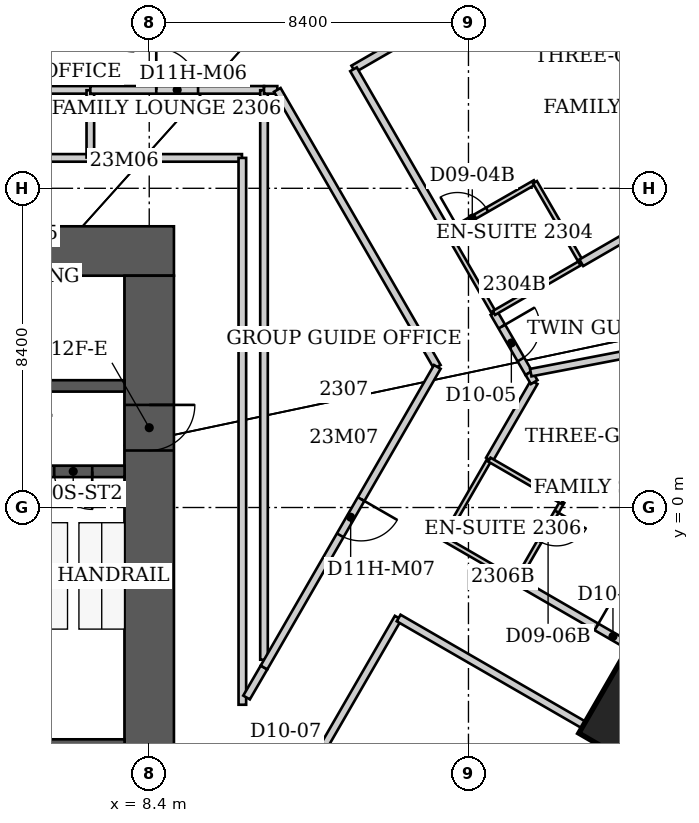
"""IFC4 building model, lengths in metres.
Left out: names, types, materials, properties, quantities, classifications, styles, units other than length and angle.
Written with IfcOpenShell. Run it as: python <this file> out.ifc"""

import sys

from ifc_helpers import new_model, si_unit, direction, frame, frame_2d, origin, origin_2d, place, context, subcontext, project, spatial, rectangle, extrude, clip, halfspace, element, fill, save


model = new_model("IFC4")
c1 = context("Model", 3, precision=1e-05, world=origin(), true_north=direction((0.0, 1.0)))
c2 = subcontext(c1, "Body", "Model", "MODEL_VIEW")
j1 = project(units=[si_unit("LENGTHUNIT", "METRE"), si_unit("PLANEANGLEUNIT", "RADIAN")], contexts=[c1])
p1 = place(None, origin())
s1 = spatial("IfcSite", under=j1, at=p1, CompositionType="ELEMENT")
p2 = place(p1, origin())
s2 = spatial("IfcBuilding", under=s1, at=p2, CompositionType="ELEMENT")
p3 = place(p2, frame((0.0, 0.0, 96.8)))
s3 = spatial("IfcBuildingStorey", under=s2, at=p3, CompositionType="ELEMENT", Elevation=96.8)
p4 = place(p3, frame((21.344, -5.499, -0.056), z_axis=(0.0, 0.0, 1.0), x_axis=(0.866025403784, -0.5, 0.0)))
e1 = element("IfcColumn", 1, at=p4, inside=s3, PredefinedType="COLUMN", context=c2, shape_type="SweptSolid", body=[
    clip(extrude(rectangle(XDim=2.4, YDim=2.4, at=origin_2d()), origin(), (0.0, 0.0, 1.0), 3.856), halfspace(frame((0.0, 0.0, 0.056)), True)),
])
p5 = place(p3, frame((-9.05, 6.75, 0.0), z_axis=(0.0, 0.0, 1.0), x_axis=(1.0, 0.0, 0.0)))
e2 = element("IfcWall", 2, at=p5, inside=s3, PredefinedType="SHEAR", context=c2, shape_type="SweptSolid", body=[
    extrude(rectangle(XDim=18.1, YDim=1.3, at=frame_2d((9.05, 0.0))), origin(), (0.0, 0.0, 1.0), 3.8),
])
p6 = place(p3, frame((8.4, -9.2, 0.0), z_axis=(0.0, 0.0, 1.0), x_axis=(0.0, 1.0, 0.0)))
e3 = element("IfcWall", 3, at=p6, inside=s3, PredefinedType="SHEAR", context=c2, shape_type="SweptSolid", body=[
    extrude(rectangle(XDim=15.3, YDim=1.3, at=frame_2d((7.65, 0.0))), origin(), (0.0, 0.0, 1.0), 3.8),
])
p7 = place(p6, frame((10.7, 0.0, 0.0)))
e4 = element("IfcOpeningElement", 4, at=p7, cuts=e3, PredefinedType="OPENING", context=c2, shape_type="SweptSolid", body=[
    extrude(rectangle(XDim=1.2, YDim=2.2, at=frame_2d((0.6, 1.1))), frame((0.0, 0.65, 0.0), z_axis=(0.0, -1.0, 0.0), x_axis=(1.0, 0.0, 0.0)), (0.0, 0.0, 1.0), 1.3),
])
p8 = place(p3, frame((-7.75, -6.5, 0.0), z_axis=(0.0, 0.0, 1.0), x_axis=(1.0, 0.0, 0.0)))
e5 = element("IfcWall", 5, at=p8, inside=s3, PredefinedType="SHEAR", context=c2, shape_type="SweptSolid", body=[
    extrude(rectangle(XDim=15.5, YDim=0.8, at=frame_2d((7.75, 0.0))), origin(), (0.0, 0.0, 1.0), 3.8),
])
p9 = place(p3, frame((4.75, 0.95, 0.0), z_axis=(0.0, 0.0, 1.0), x_axis=(1.0, 0.0, 0.0)))
e6 = element("IfcWall", 6, at=p9, inside=s3, PredefinedType="SHEAR", context=c2, shape_type="SweptSolid", body=[
    extrude(rectangle(XDim=3.0, YDim=0.3, at=frame_2d((1.5, 0.0))), origin(), (0.0, 0.0, 1.0), 3.8),
])
p10 = place(p9, frame((1.15, 0.0, 0.0)))
e7 = element("IfcOpeningElement", 7, at=p10, cuts=e6, PredefinedType="OPENING", context=c2, shape_type="SweptSolid", body=[
    extrude(rectangle(XDim=1.0, YDim=2.2, at=frame_2d((0.5, 1.1))), frame((0.0, 0.15, 0.0), z_axis=(0.0, -1.0, 0.0), x_axis=(1.0, 0.0, 0.0)), (0.0, 0.0, 1.0), 0.3),
])
p11 = place(p3, frame((-7.75, 3.2, 0.0), z_axis=(0.0, 0.0, 1.0), x_axis=(1.0, 0.0, 0.0)))
e8 = element("IfcWall", 8, at=p11, inside=s3, PredefinedType="SHEAR", context=c2, shape_type="SweptSolid", body=[
    extrude(rectangle(XDim=15.5, YDim=0.3, at=frame_2d((7.75, 0.0))), origin(), (0.0, 0.0, 1.0), 3.8),
])
p12 = place(p11, frame((9.825, 0.0, 0.0)))
e9 = element("IfcOpeningElement", 9, at=p12, cuts=e8, PredefinedType="OPENING", context=c2, shape_type="SweptSolid", body=[
    extrude(rectangle(XDim=1.1, YDim=2.2, at=frame_2d((0.55, 1.1))), frame((0.0, 0.15, 0.0), z_axis=(0.0, -1.0, 0.0), x_axis=(1.0, 0.0, 0.0)), (0.0, 0.0, 1.0), 0.3),
])
p13 = place(p3, frame((11.024, -29.171, 0.0), z_axis=(0.0, 0.0, 1.0), x_axis=(0.499999235055, 0.866025845425, 0.0)))
e10 = element("IfcWall", 10, at=p13, inside=s3, PredefinedType="PARAPET", context=c2, shape_type="SweptSolid", body=[
    extrude(rectangle(XDim=39.5, YDim=0.25, at=frame_2d((19.75, 0.0))), origin(), (0.0, 0.0, 1.0), 1.1),
])
p14 = place(p3, frame((2.28, 10.99, 0.0), z_axis=(0.0, 0.0, 1.0), x_axis=(1.0, 0.0, 0.0)))
e11 = element("IfcWall", 11, at=p14, inside=s3, PredefinedType="PARTITIONING", context=c2, shape_type="SweptSolid", body=[
    extrude(rectangle(XDim=4.57, YDim=0.2, at=frame_2d((2.285, 0.0))), origin(), (0.0, 0.0, 1.0), 3.64),
])
p15 = place(p14, frame((1.735, 0.0, 0.0)))
e12 = element("IfcOpeningElement", 12, at=p15, cuts=e11, PredefinedType="OPENING", context=c2, shape_type="SweptSolid", body=[
    extrude(rectangle(XDim=1.1, YDim=2.2, at=frame_2d((0.55, 1.1))), frame((0.0, 0.1, 0.0), z_axis=(0.0, -1.0, 0.0), x_axis=(1.0, 0.0, 0.0)), (0.0, 0.0, 1.0), 0.2),
])
p16 = place(p3, frame((6.85, 9.2, 0.0), z_axis=(0.0, 0.0, 1.0), x_axis=(-1.0, 0.0, 0.0)))
e13 = element("IfcWall", 13, at=p16, inside=s3, PredefinedType="PARTITIONING", context=c2, shape_type="SweptSolid", body=[
    extrude(rectangle(XDim=4.57, YDim=0.2, at=frame_2d((2.285, 0.0))), origin(), (0.0, 0.0, 1.0), 3.64),
])
p17 = place(p3, frame((6.85, 10.98, 0.0), z_axis=(0.0, 0.0, 1.0), x_axis=(0.0, -1.0, 0.0)))
e14 = element("IfcWall", 14, at=p17, inside=s3, PredefinedType="PARTITIONING", context=c2, shape_type="SweptSolid", body=[
    extrude(rectangle(XDim=1.77, YDim=0.2, at=frame_2d((0.885, 0.0))), origin(), (0.0, 0.0, 1.0), 3.64),
])
p18 = place(p3, frame((6.85, 10.99, 0.0), z_axis=(0.0, 0.0, 1.0), x_axis=(1.0, 0.0, 0.0)))
e15 = element("IfcWall", 15, at=p18, inside=s3, PredefinedType="PARTITIONING", context=c2, shape_type="SweptSolid", body=[
    extrude(rectangle(XDim=4.57, YDim=0.2, at=frame_2d((2.285, 0.0))), origin(), (0.0, 0.0, 1.0), 3.64),
])
p19 = place(p18, frame((1.735, 0.0, 0.0)))
e16 = element("IfcOpeningElement", 16, at=p19, cuts=e15, PredefinedType="OPENING", context=c2, shape_type="SweptSolid", body=[
    extrude(rectangle(XDim=1.1, YDim=2.2, at=frame_2d((0.55, 1.1))), frame((0.0, 0.1, 0.0), z_axis=(0.0, -1.0, 0.0), x_axis=(1.0, 0.0, 0.0)), (0.0, 0.0, 1.0), 0.2),
])
p20 = place(p3, frame((10.59, -10.45, 0.0), z_axis=(0.0, 0.0, 1.0), x_axis=(0.500072306674, 0.865983653482, 0.0)))
e17 = element("IfcWall", 17, at=p20, inside=s3, PredefinedType="PARTITIONING", context=c2, shape_type="SweptSolid", body=[
    extrude(rectangle(XDim=8.719, YDim=0.2, at=frame_2d((4.359, 0.0))), origin(), (0.0, 0.0, 1.0), 3.64),
])
p21 = place(p20, frame((3.859, 0.0, 0.0)))
e18 = element("IfcOpeningElement", 18, at=p21, cuts=e17, PredefinedType="OPENING", context=c2, shape_type="SweptSolid", body=[
    extrude(rectangle(XDim=1.0, YDim=2.13, at=frame_2d((0.5, 1.065))), frame((0.0, 0.1, 0.0), z_axis=(0.0, -1.0, 0.0), x_axis=(1.0, 0.0, 0.0)), (0.0, 0.0, 1.0), 0.2),
])
p22 = place(p3, frame((10.84, 9.2, 0.0), z_axis=(0.0, 0.0, 1.0), x_axis=(-1.0, 0.0, 0.0)))
e19 = element("IfcWall", 19, at=p22, inside=s3, PredefinedType="PARTITIONING", context=c2, shape_type="SweptSolid", body=[
    extrude(rectangle(XDim=3.99, YDim=0.2, at=frame_2d((1.995, 0.0))), origin(), (0.0, 0.0, 1.0), 3.64),
])
p23 = place(p3, frame((10.85, -5.19, 0.0), z_axis=(0.0, 0.0, 1.0), x_axis=(0.0, 1.0, 0.0)))
e20 = element("IfcWall", 20, at=p23, inside=s3, PredefinedType="PARTITIONING", context=c2, shape_type="SweptSolid", body=[
    extrude(rectangle(XDim=14.39, YDim=0.2, at=frame_2d((7.195, 0.0))), origin(), (0.0, 0.0, 1.0), 3.64),
])
p24 = place(p3, frame((11.42, -4.21, 0.0), z_axis=(0.0, 0.0, 1.0), x_axis=(-0.502657614045, -0.8644855829, 0.0)))
e21 = element("IfcWall", 21, at=p24, inside=s3, PredefinedType="PARTITIONING", context=c2, shape_type="SweptSolid", body=[
    extrude(rectangle(XDim=0.914, YDim=0.2, at=frame_2d((0.457, 0.0))), origin(), (0.0, 0.0, 1.0), 3.64),
])
p25 = place(p3, frame((11.42, 10.98, 0.0), z_axis=(0.0, 0.0, 1.0), x_axis=(0.0, -1.0, 0.0)))
e22 = element("IfcWall", 22, at=p25, inside=s3, PredefinedType="PARTITIONING", context=c2, shape_type="SweptSolid", body=[
    extrude(rectangle(XDim=14.985, YDim=0.2, at=frame_2d((7.492, 0.0))), origin(), (0.0, 0.0, 1.0), 3.64),
])
p26 = place(p3, frame((11.42, 10.99, 0.0), z_axis=(0.0, 0.0, 1.0), x_axis=(1.0, 0.0, 0.0)))
e23 = element("IfcWall", 23, at=p26, inside=s3, PredefinedType="PARTITIONING", context=c2, shape_type="SweptSolid", body=[
    extrude(rectangle(XDim=0.35, YDim=0.2, at=frame_2d((0.175, 0.0))), origin(), (0.0, 0.0, 1.0), 3.64),
])
p27 = place(p3, frame((11.77, 10.99, 0.0), z_axis=(0.0, 0.0, 1.0), x_axis=(0.500093981358, -0.865971136822, 0.0)))
e24 = element("IfcWall", 24, at=p27, inside=s3, PredefinedType="PARTITIONING", context=c2, shape_type="SweptSolid", body=[
    extrude(rectangle(XDim=8.418, YDim=0.2, at=frame_2d((4.209, 0.0))), origin(), (0.0, 0.0, 1.0), 3.64),
])
p28 = place(p3, frame((13.77, 11.54, 0.0), z_axis=(0.0, 0.0, 1.0), x_axis=(0.865951726818, 0.500127590541, 0.0)))
e25 = element("IfcWall", 25, at=p28, inside=s3, PredefinedType="PARTITIONING", context=c2, shape_type="SweptSolid", body=[
    extrude(rectangle(XDim=10.467, YDim=0.2, at=frame_2d((5.233, 0.0))), origin(), (0.0, 0.0, 1.0), 3.64),
])
p29 = place(p28, frame((4.734, 0.0, 0.0)))
e26 = element("IfcOpeningElement", 26, at=p29, cuts=e25, PredefinedType="OPENING", context=c2, shape_type="SweptSolid", body=[
    extrude(rectangle(XDim=1.0, YDim=2.13, at=frame_2d((0.5, 1.065))), frame((0.0, 0.1, 0.0), z_axis=(0.0, -1.0, 0.0), x_axis=(1.0, 0.0, 0.0)), (0.0, 0.0, 1.0), 0.2),
])
p30 = place(p3, frame((13.775, 11.531, 0.0), z_axis=(0.0, 0.0, 1.0), x_axis=(0.499378257914, -0.866384069292, 0.0)))
e27 = element("IfcWall", 27, at=p30, inside=s3, PredefinedType="PARTITIONING", context=c2, shape_type="SweptSolid", body=[
    extrude(rectangle(XDim=4.954, YDim=0.2, at=frame_2d((2.477, 0.0))), origin(), (0.0, 0.0, 1.0), 3.64),
])
p31 = place(p3, frame((14.963, -2.907, 0.0), z_axis=(0.0, 0.0, 1.0), x_axis=(0.865876457216, -0.50025789433, 0.0)))
e28 = element("IfcWall", 28, at=p31, inside=s3, PredefinedType="PARTITIONING", context=c2, shape_type="SweptSolid", body=[
    extrude(rectangle(XDim=8.051, YDim=0.2, at=frame_2d((4.025, 0.0))), origin(), (0.0, 0.0, 1.0), 3.64),
])
p32 = place(p3, frame((15.98, 3.7, 0.0), z_axis=(0.0, 0.0, 1.0), x_axis=(-0.499446957289, -0.866344467781, 0.0)))
e29 = element("IfcWall", 29, at=p32, inside=s3, PredefinedType="PARTITIONING", context=c2, shape_type="SweptSolid", body=[
    extrude(rectangle(XDim=9.13, YDim=0.2, at=frame_2d((4.565, 0.0))), origin(), (0.0, 0.0, 1.0), 3.64),
])
p33 = place(p32, frame((4.015, 0.0, 0.0)))
e30 = element("IfcOpeningElement", 30, at=p33, cuts=e29, PredefinedType="OPENING", context=c2, shape_type="SweptSolid", body=[
    extrude(rectangle(XDim=1.1, YDim=2.2, at=frame_2d((0.55, 1.1))), frame((0.0, 0.1, 0.0), z_axis=(0.0, -1.0, 0.0), x_axis=(1.0, 0.0, 0.0)), (0.0, 0.0, 1.0), 0.2),
])
p34 = place(p3, frame((16.15, -0.82, 0.0), z_axis=(0.0, 0.0, 1.0), x_axis=(0.499769390944, 0.866158505053, 0.0)))
e31 = element("IfcWall", 31, at=p34, inside=s3, PredefinedType="PARTITIONING", context=c2, shape_type="SweptSolid", body=[
    extrude(rectangle(XDim=2.402, YDim=0.12, at=frame_2d((1.201, 0.0))), origin(), (0.0, 0.0, 1.0), 3.64),
])
p35 = place(p3, frame((16.15, -0.82, 0.0), z_axis=(0.0, 0.0, 1.0), x_axis=(0.865780289733, -0.50042430987, 0.0)))
e32 = element("IfcWall", 32, at=p35, inside=s3, PredefinedType="PARTITIONING", context=c2, shape_type="SweptSolid", body=[
    extrude(rectangle(XDim=2.218, YDim=0.12, at=frame_2d((1.109, 0.0))), origin(), (0.0, 0.0, 1.0), 3.64),
])
p36 = place(p3, frame((16.249, 7.239, 0.0), z_axis=(0.0, 0.0, 1.0), x_axis=(0.499296083727, -0.866431428778, 0.0)))
e33 = element("IfcWall", 33, at=p36, inside=s3, PredefinedType="PARTITIONING", context=c2, shape_type="SweptSolid", body=[
    extrude(rectangle(XDim=2.446, YDim=0.12, at=frame_2d((1.223, 0.0))), origin(), (0.0, 0.0, 1.0), 3.64),
])
p37 = place(p3, frame((17.35, 1.26, 0.0), z_axis=(0.0, 0.0, 1.0), x_axis=(0.500672785493, 0.8656366223, 0.0)))
e34 = element("IfcWall", 34, at=p37, inside=s3, PredefinedType="PARTITIONING", context=c2, shape_type="SweptSolid", body=[
    extrude(rectangle(XDim=2.357, YDim=0.2, at=frame_2d((1.178, 0.0))), origin(), (0.0, 0.0, 1.0), 3.64),
])
p38 = place(p3, frame((17.47, 5.12, 0.0), z_axis=(0.0, 0.0, 1.0), x_axis=(0.501536229379, -0.865136642745, 0.0)))
e35 = element("IfcWall", 35, at=p38, inside=s3, PredefinedType="PARTITIONING", context=c2, shape_type="SweptSolid", body=[
    extrude(rectangle(XDim=1.828, YDim=0.2, at=frame_2d((0.914, 0.0))), origin(), (0.0, 0.0, 1.0), 3.64),
])
p39 = place(p38, frame((0.414, 0.0, 0.0)))
e36 = element("IfcOpeningElement", 36, at=p39, cuts=e35, PredefinedType="OPENING", context=c2, shape_type="SweptSolid", body=[
    extrude(rectangle(XDim=1.0, YDim=2.13, at=frame_2d((0.5, 1.065))), frame((0.0, 0.1, 0.0), z_axis=(0.0, -1.0, 0.0), x_axis=(1.0, 0.0, 0.0)), (0.0, 0.0, 1.0), 0.2),
])
p40 = place(p3, frame((17.47, 5.12, 0.0), z_axis=(0.0, 0.0, 1.0), x_axis=(0.865715544058, 0.500536309148, 0.0)))
e37 = element("IfcWall", 37, at=p40, inside=s3, PredefinedType="PARTITIONING", context=c2, shape_type="SweptSolid", body=[
    extrude(rectangle(XDim=2.657, YDim=0.12, at=frame_2d((1.328, 0.0))), origin(), (0.0, 0.0, 1.0), 3.64),
])
p41 = place(p3, frame((18.07, -1.93, 0.0), z_axis=(0.0, 0.0, 1.0), x_axis=(0.499737123639, 0.866177122335, 0.0)))
e38 = element("IfcWall", 38, at=p41, inside=s3, PredefinedType="PARTITIONING", context=c2, shape_type="SweptSolid", body=[
    extrude(rectangle(XDim=2.401, YDim=0.12, at=frame_2d((1.201, 0.0))), origin(), (0.0, 0.0, 1.0), 3.64),
])
p42 = place(p41, frame((1.201, 0.0, 0.0)))
e39 = element("IfcOpeningElement", 39, at=p42, cuts=e38, PredefinedType="OPENING", context=c2, shape_type="SweptSolid", body=[
    extrude(rectangle(XDim=0.9, YDim=2.03, at=frame_2d((0.45, 1.015))), frame((0.0, 0.06, 0.0), z_axis=(0.0, -1.0, 0.0), x_axis=(1.0, 0.0, 0.0)), (0.0, 0.0, 1.0), 0.12),
])
p43 = place(p3, frame((18.07, -1.93, 0.0), z_axis=(0.0, 0.0, 1.0), x_axis=(0.865924141063, -0.500175351175, 0.0)))
e40 = element("IfcWall", 40, at=p43, inside=s3, PredefinedType="PARTITIONING", context=c2, shape_type="SweptSolid", body=[
    extrude(rectangle(XDim=5.848, YDim=0.2, at=frame_2d((2.924, 0.0))), origin(), (0.0, 0.0, 1.0), 3.64),
])
p44 = place(p43, frame((2.424, 0.0, 0.0)))
e41 = element("IfcOpeningElement", 41, at=p44, cuts=e40, PredefinedType="OPENING", context=c2, shape_type="SweptSolid", body=[
    extrude(rectangle(XDim=1.0, YDim=2.13, at=frame_2d((0.5, 1.065))), frame((0.0, 0.1, 0.0), z_axis=(0.0, -1.0, 0.0), x_axis=(1.0, 0.0, 0.0)), (0.0, 0.0, 1.0), 0.2),
])
p45 = place(p3, frame((18.387, 3.538, 0.0), z_axis=(0.0, 0.0, 1.0), x_axis=(0.514754090884, -0.857337871506, 0.0)))
e42 = element("IfcWall", 42, at=p45, inside=s3, PredefinedType="PARTITIONING", context=c2, shape_type="SweptSolid", body=[
    extrude(rectangle(XDim=0.278, YDim=0.2, at=frame_2d((0.139, 0.0))), origin(), (0.0, 0.0, 1.0), 3.64),
])
p46 = place(p3, frame((18.439, 3.549, 0.0), z_axis=(0.0, 0.0, 1.0), x_axis=(0.982105276165, 0.188332754797, 0.0)))
e43 = element("IfcWall", 43, at=p46, inside=s3, PredefinedType="PARTITIONING", context=c2, shape_type="SweptSolid", body=[
    extrude(rectangle(XDim=5.367, YDim=0.2, at=frame_2d((2.683, 0.0))), origin(), (0.0, 0.0, 1.0), 3.64),
])
p47 = place(p3, frame((18.55, 8.56, 0.0), z_axis=(0.0, 0.0, 1.0), x_axis=(-0.867306827682, -0.497773911185, 0.0)))
e44 = element("IfcWall", 44, at=p47, inside=s3, PredefinedType="PARTITIONING", context=c2, shape_type="SweptSolid", body=[
    extrude(rectangle(XDim=2.652, YDim=0.12, at=frame_2d((1.326, 0.0))), origin(), (0.0, 0.0, 1.0), 2.726),
])
p48 = place(p47, frame((1.452, 0.0, 0.0)))
e45 = element("IfcOpeningElement", 45, at=p48, cuts=e44, PredefinedType="OPENING", context=c2, shape_type="SweptSolid", body=[
    extrude(rectangle(XDim=0.9, YDim=2.03, at=frame_2d((0.45, 1.015))), frame((0.0, 0.06, 0.0), z_axis=(0.0, -1.0, 0.0), x_axis=(1.0, 0.0, 0.0)), (0.0, 0.0, 1.0), 0.12),
])
p49 = place(p3, frame((19.27, 0.15, 0.0), z_axis=(0.0, 0.0, 1.0), x_axis=(-0.865732595383, 0.500506816428, 0.0)))
e46 = element("IfcWall", 46, at=p49, inside=s3, PredefinedType="PARTITIONING", context=c2, shape_type="SweptSolid", body=[
    extrude(rectangle(XDim=2.218, YDim=0.12, at=frame_2d((1.109, 0.0))), origin(), (0.0, 0.0, 1.0), 3.038),
])
p50 = place(p3, frame((19.77, 6.45, 0.0), z_axis=(0.0, 0.0, 1.0), x_axis=(-0.500522890398, 0.865723302324, 0.0)))
e47 = element("IfcWall", 47, at=p50, inside=s3, PredefinedType="PARTITIONING", context=c2, shape_type="SweptSolid", body=[
    extrude(rectangle(XDim=2.438, YDim=0.12, at=frame_2d((1.219, 0.0))), origin(), (0.0, 0.0, 1.0), 3.64),
])
p51 = place(p3, frame((26.466, 10.31, 0.0), z_axis=(0.0, 0.0, 1.0), x_axis=(-0.865792743708, -0.500402762725, 0.0)))
e48 = element("IfcWall", 48, at=p51, inside=s3, PredefinedType="PARTITIONING", context=c2, shape_type="SweptSolid", body=[
    extrude(rectangle(XDim=7.734, YDim=0.2, at=frame_2d((3.867, 0.0))), origin(), (0.0, 0.0, 1.0), 3.64),
])
p52 = place(p48, origin())
e49 = element("IfcDoor", 49, at=p52, inside=s3, OperationType="SINGLE_SWING_RIGHT", PredefinedType="DOOR", context=c2, shape_type="SweptSolid", body=[
    extrude(rectangle(XDim=0.9, YDim=2.03, at=frame_2d((0.45, 1.015))), frame((0.0, 0.025, 0.0), z_axis=(0.0, -1.0, 0.0), x_axis=(1.0, 0.0, 0.0)), (0.0, 0.0, 1.0), 0.05),
])
fill(e45, e49)
p53 = place(p39, origin())
e50 = element("IfcDoor", 50, at=p53, inside=s3, OperationType="SINGLE_SWING_LEFT", PredefinedType="DOOR", context=c2, shape_type="SweptSolid", body=[
    extrude(rectangle(XDim=1.0, YDim=2.13, at=frame_2d((0.5, 1.065))), frame((0.0, 0.025, 0.0), z_axis=(0.0, -1.0, 0.0), x_axis=(1.0, 0.0, 0.0)), (0.0, 0.0, 1.0), 0.05),
])
fill(e36, e50)
p54 = place(p44, origin())
e51 = element("IfcDoor", 51, at=p54, inside=s3, OperationType="SINGLE_SWING_LEFT", PredefinedType="DOOR", context=c2, shape_type="SweptSolid", body=[
    extrude(rectangle(XDim=1.0, YDim=2.13, at=frame_2d((0.5, 1.065))), frame((0.0, 0.025, 0.0), z_axis=(0.0, -1.0, 0.0), x_axis=(1.0, 0.0, 0.0)), (0.0, 0.0, 1.0), 0.05),
])
fill(e41, e51)
p55 = place(p42, origin())
e52 = element("IfcDoor", 52, at=p55, inside=s3, OperationType="SINGLE_SWING_RIGHT", PredefinedType="DOOR", context=c2, shape_type="SweptSolid", body=[
    extrude(rectangle(XDim=0.9, YDim=2.03, at=frame_2d((0.45, 1.015))), frame((0.0, 0.025, 0.0), z_axis=(0.0, -1.0, 0.0), x_axis=(1.0, 0.0, 0.0)), (0.0, 0.0, 1.0), 0.05),
])
fill(e39, e52)
p56 = place(p19, origin())
e53 = element("IfcDoor", 53, at=p56, inside=s3, OperationType="SINGLE_SWING_LEFT", PredefinedType="DOOR", context=c2, shape_type="SweptSolid", body=[
    extrude(rectangle(XDim=1.1, YDim=2.2, at=frame_2d((0.55, 1.1))), frame((0.0, 0.025, 0.0), z_axis=(0.0, -1.0, 0.0), x_axis=(1.0, 0.0, 0.0)), (0.0, 0.0, 1.0), 0.05),
])
fill(e16, e53)
p57 = place(p33, origin())
e54 = element("IfcDoor", 54, at=p57, inside=s3, OperationType="SINGLE_SWING_LEFT", PredefinedType="DOOR", context=c2, shape_type="SweptSolid", body=[
    extrude(rectangle(XDim=1.1, YDim=2.2, at=frame_2d((0.55, 1.1))), frame((0.0, 0.025, 0.0), z_axis=(0.0, -1.0, 0.0), x_axis=(1.0, 0.0, 0.0)), (0.0, 0.0, 1.0), 0.05),
])
fill(e30, e54)
p58 = place(p10, origin())
e55 = element("IfcDoor", 55, at=p58, inside=s3, OperationType="SINGLE_SWING_RIGHT", PredefinedType="DOOR", context=c2, shape_type="SweptSolid", body=[
    extrude(rectangle(XDim=1.0, YDim=2.2, at=frame_2d((0.5, 1.1))), frame((0.0, 0.025, 0.0), z_axis=(0.0, -1.0, 0.0), x_axis=(1.0, 0.0, 0.0)), (0.0, 0.0, 1.0), 0.05),
])
fill(e7, e55)
p59 = place(p7, origin())
e56 = element("IfcDoor", 56, at=p59, inside=s3, OperationType="SINGLE_SWING_RIGHT", PredefinedType="DOOR", context=c2, shape_type="SweptSolid", body=[
    extrude(rectangle(XDim=1.2, YDim=2.2, at=frame_2d((0.6, 1.1))), frame((0.0, 0.025, 0.0), z_axis=(0.0, -1.0, 0.0), x_axis=(1.0, 0.0, 0.0)), (0.0, 0.0, 1.0), 0.05),
])
fill(e4, e56)
save(model, sys.argv[1])
